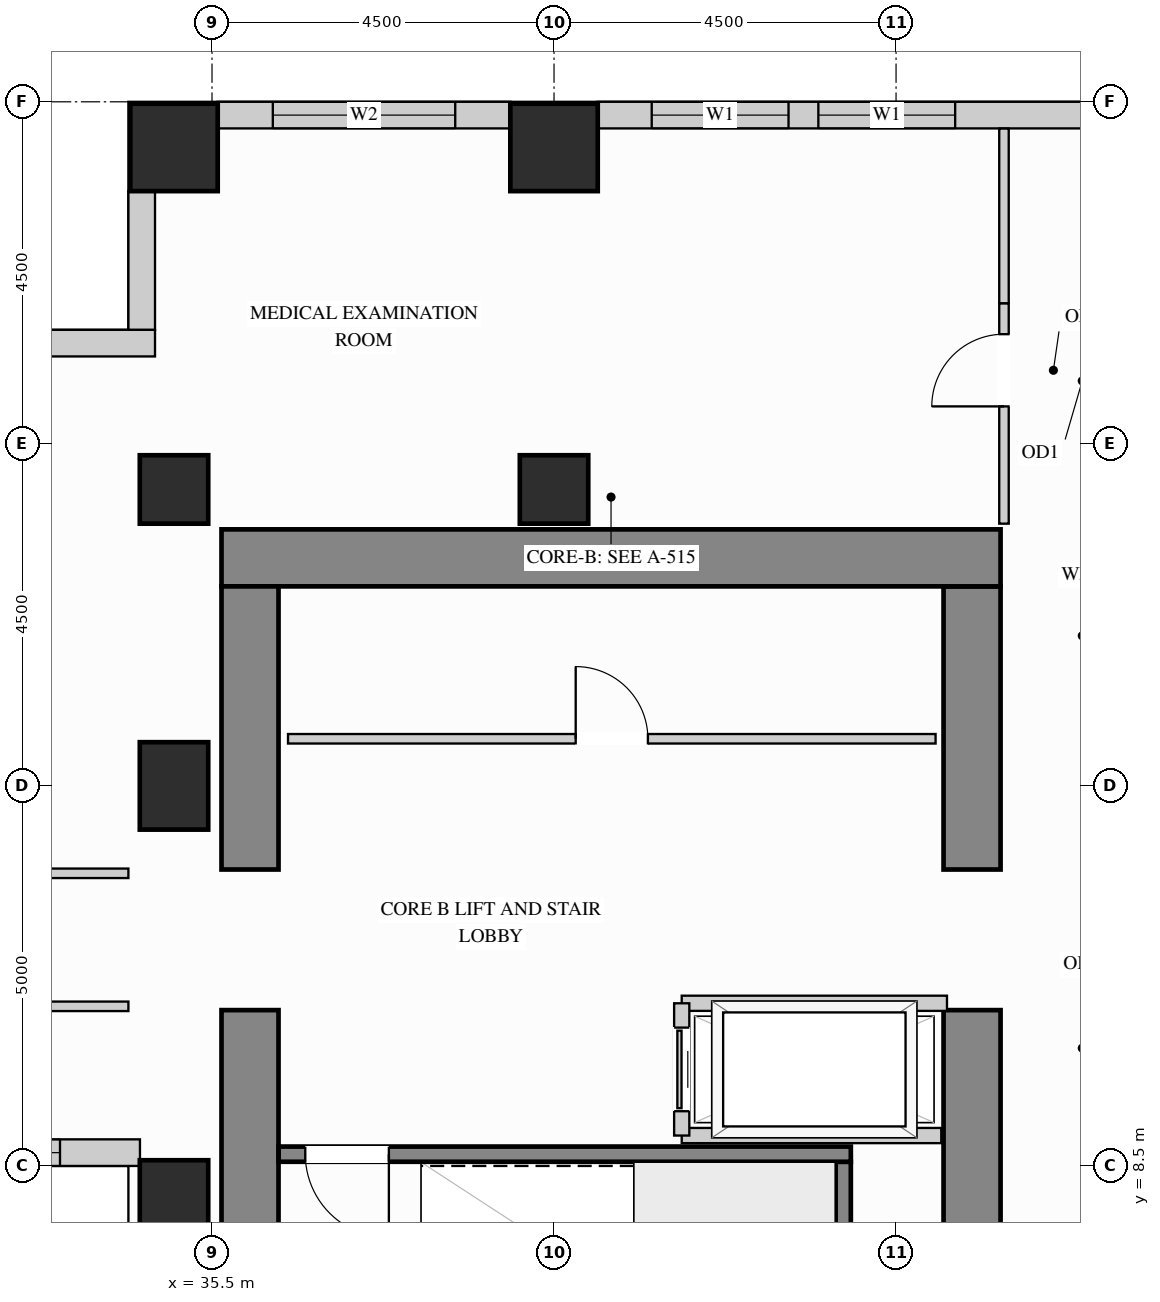
"""IFC4 building model, lengths in metres.
Left out: names, types, materials, properties, quantities, classifications, styles, units other than length and angle.
Written with IfcOpenShell. Run it as: python <this file> out.ifc"""

import sys

from ifc_helpers import new_model, si_unit, direction, frame, frame_2d, origin, origin_2d, place, context, subcontext, project, spatial, rectangle, extrude, source, transform, mapped, element, fill, save


model = new_model("IFC4")
c1 = context("Model", 3, precision=1e-05, world=origin(), true_north=direction((0.0, 1.0)))
c2 = subcontext(c1, "Body", "Model", "MODEL_VIEW")
j1 = project(units=[si_unit("LENGTHUNIT", "METRE"), si_unit("PLANEANGLEUNIT", "RADIAN")], contexts=[c1])
p1 = place(None, origin())
s1 = spatial("IfcSite", under=j1, at=p1, CompositionType="ELEMENT")
p2 = place(p1, origin())
s2 = spatial("IfcBuilding", under=s1, at=p2, CompositionType="ELEMENT")
p3 = place(p2, frame((0.0, 0.0, 91.8)))
s3 = spatial("IfcBuildingStorey", under=s2, at=p3, CompositionType="ELEMENT", Elevation=91.8)
m1 = source(origin(), c2, "Body", "SweptSolid", [
    extrude(rectangle(XDim=0.9, YDim=0.9, at=origin_2d()), origin(), (0.0, 0.0, 1.0), 3.38),
])
for number, where, z_axis, x_axis in (
    (1, (35.0, 17.4, 0.0), (0.0, 0.0, 1.0), (1.0, 0.0, 0.0)),
    (2, (40.0, 17.4, 0.0), (0.0, 0.0, 1.0), (1.0, 0.0, 0.0)),
):
    element("IfcColumn", number, at=place(p3, frame(where, z_axis=z_axis, x_axis=x_axis)), inside=s3, PredefinedType="COLUMN", context=c2, shape_type="MappedRepresentation", body=[
        mapped(m1, transform((0.0, 0.0, 0.0), x_axis=(1.0, 0.0, 0.0), y_axis=(0.0, 1.0, 0.0), z_axis=(0.0, 0.0, 1.0))),
    ])
m2 = source(origin(), c2, "Body", "SweptSolid", [
    extrude(rectangle(XDim=0.9, YDim=1.15, at=origin_2d()), origin(), (0.0, 0.0, 1.0), 3.38),
])
for number, where, z_axis, x_axis in (
    (3, (35.0, 13.5, 0.0), (0.0, 0.0, 1.0), (1.0, 0.0, 0.0)),
    (4, (35.0, 8.0, 0.0), (0.0, 0.0, 1.0), (1.0, 0.0, 0.0)),
):
    element("IfcColumn", number, at=place(p3, frame(where, z_axis=z_axis, x_axis=x_axis)), inside=s3, PredefinedType="COLUMN", context=c2, shape_type="MappedRepresentation", body=[
        mapped(m2, transform((0.0, 0.0, 0.0), x_axis=(1.0, 0.0, 0.0), y_axis=(0.0, 1.0, 0.0), z_axis=(0.0, 0.0, 1.0))),
    ])
m3 = source(origin(), c2, "Body", "SweptSolid", [
    extrude(rectangle(XDim=1.15, YDim=1.15, at=origin_2d()), origin(), (0.0, 0.0, 1.0), 3.38),
])
for number, where, z_axis, x_axis in (
    (5, (35.0, 21.9, 0.0), (0.0, 0.0, 1.0), (1.0, 0.0, 0.0)),
    (6, (40.0, 21.9, 0.0), (0.0, 0.0, 1.0), (1.0, 0.0, 0.0)),
):
    element("IfcColumn", number, at=place(p3, frame(where, z_axis=z_axis, x_axis=x_axis)), inside=s3, PredefinedType="COLUMN", context=c2, shape_type="MappedRepresentation", body=[
        mapped(m3, transform((0.0, 0.0, 0.0), x_axis=(1.0, 0.0, 0.0), y_axis=(0.0, 1.0, 0.0), z_axis=(0.0, 0.0, 1.0))),
    ])
m4 = source(origin(), c2, "Body", "SweptSolid", [
    extrude(rectangle(XDim=5.675, YDim=0.75, at=frame_2d((2.837, 0.0))), origin(), (0.0, 0.0, 1.0), 3.38),
])
p4 = place(p3, frame((45.5, 4.875, 0.0), z_axis=(0.0, 0.0, 1.0), x_axis=(0.0, 1.0, 0.0)))
e7 = element("IfcWall", 7, at=p4, inside=s3, PredefinedType="SHEAR", context=c2, shape_type="MappedRepresentation", body=[
    mapped(m4, transform((0.0, 0.0, 0.0), x_axis=(1.0, 0.0, 0.0), y_axis=(0.0, 1.0, 0.0), z_axis=(0.0, 0.0, 1.0))),
])
m5 = source(origin(), c2, "Body", "SweptSolid", [
    extrude(rectangle(XDim=3.725, YDim=0.75, at=frame_2d((1.863, 0.0))), origin(), (0.0, 0.0, 1.0), 3.38),
])
p5 = place(p3, frame((45.5, 12.4, 0.0), z_axis=(0.0, 0.0, 1.0), x_axis=(0.0, 1.0, 0.0)))
e8 = element("IfcWall", 8, at=p5, inside=s3, PredefinedType="SHEAR", context=c2, shape_type="MappedRepresentation", body=[
    mapped(m5, transform((0.0, 0.0, 0.0), x_axis=(1.0, 0.0, 0.0), y_axis=(0.0, 1.0, 0.0), z_axis=(0.0, 0.0, 1.0))),
])
m6 = source(origin(), c2, "Body", "SweptSolid", [
    extrude(rectangle(XDim=10.25, YDim=0.75, at=frame_2d((5.125, 0.0))), origin(), (0.0, 0.0, 1.0), 3.38),
])
p6 = place(p3, frame((35.625, 16.5, 0.0), z_axis=(0.0, 0.0, 1.0), x_axis=(1.0, 0.0, 0.0)))
e9 = element("IfcWall", 9, at=p6, inside=s3, PredefinedType="SHEAR", context=c2, shape_type="MappedRepresentation", body=[
    mapped(m6, transform((0.0, 0.0, 0.0), x_axis=(1.0, 0.0, 0.0), y_axis=(0.0, 1.0, 0.0), z_axis=(0.0, 0.0, 1.0))),
])
p7 = place(p3, frame((36.0, 4.875, 0.0), z_axis=(0.0, 0.0, 1.0), x_axis=(0.0, 1.0, 0.0)))
e10 = element("IfcWall", 10, at=p7, inside=s3, PredefinedType="SHEAR", context=c2, shape_type="MappedRepresentation", body=[
    mapped(m4, transform((0.0, 0.0, 0.0), x_axis=(1.0, 0.0, 0.0), y_axis=(0.0, 1.0, 0.0), z_axis=(0.0, 0.0, 1.0))),
])
p8 = place(p3, frame((36.0, 12.4, 0.0), z_axis=(0.0, 0.0, 1.0), x_axis=(0.0, 1.0, 0.0)))
e11 = element("IfcWall", 11, at=p8, inside=s3, PredefinedType="SHEAR", context=c2, shape_type="MappedRepresentation", body=[
    mapped(m5, transform((0.0, 0.0, 0.0), x_axis=(1.0, 0.0, 0.0), y_axis=(0.0, 1.0, 0.0), z_axis=(0.0, 0.0, 1.0))),
])
p9 = place(p3, frame((30.948, 8.675, 0.0), z_axis=(0.0, 0.0, 1.0), x_axis=(1.0, 0.0, 0.0)))
e12 = element("IfcWall", 12, at=p9, inside=s3, PredefinedType="SOLIDWALL", context=c2, shape_type="SweptSolid", body=[
    extrude(rectangle(XDim=3.604, YDim=0.35, at=frame_2d((1.802, 0.0))), origin(), (0.0, 0.0, 1.0), 3.365),
])
p10 = place(p9, frame((1.052, 0.0, 0.78)))
e13 = element("IfcOpeningElement", 13, at=p10, cuts=e12, PredefinedType="OPENING", context=c2, shape_type="SweptSolid", body=[
    extrude(rectangle(XDim=1.5, YDim=2.0, at=frame_2d((0.75, 1.0))), frame((0.0, 0.185, 0.0), z_axis=(0.0, -1.0, 0.0), x_axis=(1.0, 0.0, 0.0)), (0.0, 0.0, 1.0), 0.37),
])
p11 = place(p3, frame((47.027, 22.325, 0.0), z_axis=(0.0, 0.0, 1.0), x_axis=(-1.0, 0.0, 0.0)))
e14 = element("IfcWall", 14, at=p11, inside=s3, PredefinedType="SOLIDWALL", context=c2, shape_type="SweptSolid", body=[
    extrude(rectangle(XDim=6.454, YDim=0.35, at=frame_2d((3.227, 0.0))), origin(), (0.0, 0.0, 1.0), 3.365),
])
p12 = place(p11, frame((1.749, 0.0, 0.78)))
e15 = element("IfcOpeningElement", 15, at=p12, cuts=e14, PredefinedType="OPENING", context=c2, shape_type="SweptSolid", body=[
    extrude(rectangle(XDim=1.8, YDim=2.1, at=frame_2d((0.9, 1.05))), frame((0.0, 0.185, 0.0), z_axis=(0.0, -1.0, 0.0), x_axis=(1.0, 0.0, 0.0)), (0.0, 0.0, 1.0), 0.37),
])
p13 = place(p11, frame((3.942, 0.0, 0.78)))
e16 = element("IfcOpeningElement", 16, at=p13, cuts=e14, PredefinedType="OPENING", context=c2, shape_type="SweptSolid", body=[
    extrude(rectangle(XDim=1.8, YDim=2.1, at=frame_2d((0.9, 1.05))), frame((0.0, 0.185, 0.0), z_axis=(0.0, -1.0, 0.0), x_axis=(1.0, 0.0, 0.0)), (0.0, 0.0, 1.0), 0.37),
])
p14 = place(p3, frame((39.427, 22.325, 0.0), z_axis=(0.0, 0.0, 1.0), x_axis=(-1.0, 0.0, 0.0)))
e17 = element("IfcWall", 17, at=p14, inside=s3, PredefinedType="SOLIDWALL", context=c2, shape_type="SweptSolid", body=[
    extrude(rectangle(XDim=3.854, YDim=0.35, at=frame_2d((1.927, 0.0))), origin(), (0.0, 0.0, 1.0), 3.365),
])
p15 = place(p14, frame((0.727, 0.0, 0.78)))
e18 = element("IfcOpeningElement", 18, at=p15, cuts=e17, PredefinedType="OPENING", context=c2, shape_type="SweptSolid", body=[
    extrude(rectangle(XDim=2.4, YDim=2.1, at=frame_2d((1.2, 1.05))), frame((0.0, 0.185, 0.0), z_axis=(0.0, -1.0, 0.0), x_axis=(1.0, 0.0, 0.0)), (0.0, 0.0, 1.0), 0.37),
])
m7 = source(origin(), c2, "Body", "SweptSolid", [
    extrude(rectangle(XDim=1.829, YDim=0.35, at=frame_2d((0.915, 0.0))), origin(), (0.0, 0.0, 1.0), 3.365),
])
p16 = place(p3, frame((34.575, 21.327, 0.0), z_axis=(0.0, 0.0, 1.0), x_axis=(0.0, -1.0, 0.0)))
e19 = element("IfcWall", 19, at=p16, inside=s3, PredefinedType="SOLIDWALL", context=c2, shape_type="MappedRepresentation", body=[
    mapped(m7, transform((0.0, 0.0, 0.0), x_axis=(1.0, 0.0, 0.0), y_axis=(0.0, 1.0, 0.0), z_axis=(0.0, 0.0, 1.0))),
])
p17 = place(p3, frame((34.75, 19.325, 0.0), z_axis=(0.0, 0.0, 1.0), x_axis=(-1.0, 0.0, 0.0)))
e20 = element("IfcWall", 20, at=p17, inside=s3, PredefinedType="SOLIDWALL", context=c2, shape_type="SweptSolid", body=[
    extrude(rectangle(XDim=15.6, YDim=0.35, at=frame_2d((7.8, 0.0))), origin(), (0.0, 0.0, 1.0), 3.365),
])
p18 = place(p17, frame((4.307, 0.0, 0.78)))
e21 = element("IfcOpeningElement", 21, at=p18, cuts=e20, PredefinedType="OPENING", context=c2, shape_type="SweptSolid", body=[
    extrude(rectangle(XDim=1.5, YDim=2.0, at=frame_2d((0.75, 1.0))), frame((0.0, 0.185, 0.0), z_axis=(0.0, -1.0, 0.0), x_axis=(1.0, 0.0, 0.0)), (0.0, 0.0, 1.0), 0.37),
])
p19 = place(p17, frame((9.793, 0.0, 0.78)))
e22 = element("IfcOpeningElement", 22, at=p19, cuts=e20, PredefinedType="OPENING", context=c2, shape_type="SweptSolid", body=[
    extrude(rectangle(XDim=1.5, YDim=2.0, at=frame_2d((0.75, 1.0))), frame((0.0, 0.185, 0.0), z_axis=(0.0, -1.0, 0.0), x_axis=(1.0, 0.0, 0.0)), (0.0, 0.0, 1.0), 0.37),
])
p20 = place(p3, frame((36.5, 14.12, 0.0), z_axis=(0.0, 0.0, 1.0), x_axis=(1.0, 0.0, 0.0)))
e23 = element("IfcWall", 23, at=p20, inside=s3, PredefinedType="PARTITIONING", context=c2, shape_type="SweptSolid", body=[
    extrude(rectangle(XDim=8.52, YDim=0.125, at=frame_2d((4.26, 0.0))), origin(), (0.0, 0.0, 1.0), 3.365),
])
p21 = place(p20, frame((3.785, 0.0, 0.0)))
e24 = element("IfcOpeningElement", 24, at=p21, cuts=e23, PredefinedType="OPENING", context=c2, shape_type="SweptSolid", body=[
    extrude(rectangle(XDim=0.95, YDim=2.15, at=frame_2d((0.475, 1.075))), frame((0.0, 0.073, 0.0), z_axis=(0.0, -1.0, 0.0), x_axis=(1.0, 0.0, 0.0)), (0.0, 0.0, 1.0), 0.145),
])
p22 = place(p3, frame((45.92, 16.95, 0.0), z_axis=(0.0, 0.0, 1.0), x_axis=(0.0, 1.0, 0.0)))
e25 = element("IfcWall", 25, at=p22, inside=s3, PredefinedType="PARTITIONING", context=c2, shape_type="SweptSolid", body=[
    extrude(rectangle(XDim=2.9, YDim=0.125, at=frame_2d((1.45, 0.0))), origin(), (0.0, 0.0, 1.0), 3.365),
])
p23 = place(p22, frame((1.543, 0.0, 0.0)))
e26 = element("IfcOpeningElement", 26, at=p23, cuts=e25, PredefinedType="OPENING", context=c2, shape_type="SweptSolid", body=[
    extrude(rectangle(XDim=0.95, YDim=2.15, at=frame_2d((0.475, 1.075))), frame((0.0, 0.073, 0.0), z_axis=(0.0, -1.0, 0.0), x_axis=(1.0, 0.0, 0.0)), (0.0, 0.0, 1.0), 0.145),
])
m8 = source(origin(), c2, "Body", "SweptSolid", [
    extrude(rectangle(XDim=2.298, YDim=0.125, at=frame_2d((1.149, 0.0))), origin(), (0.0, 0.0, 1.0), 3.365),
])
p24 = place(p3, frame((45.92, 19.85, 0.0), z_axis=(0.0, 0.0, 1.0), x_axis=(0.0, 1.0, 0.0)))
e27 = element("IfcWall", 27, at=p24, inside=s3, PredefinedType="PARTITIONING", context=c2, shape_type="MappedRepresentation", body=[
    mapped(m8, transform((0.0, 0.0, 0.0), x_axis=(1.0, 0.0, 0.0), y_axis=(0.0, 1.0, 0.0), z_axis=(0.0, 0.0, 1.0))),
])
p25 = place(p3, frame((29.85, 12.35, 0.0), z_axis=(0.0, 0.0, 1.0), x_axis=(1.0, 0.0, 0.0)))
e28 = element("IfcWall", 28, at=p25, inside=s3, PredefinedType="PARTITIONING", context=c2, shape_type="SweptSolid", body=[
    extrude(rectangle(XDim=4.55, YDim=0.125, at=frame_2d((2.275, 0.0))), origin(), (0.0, 0.0, 1.0), 3.365),
])
p26 = place(p25, frame((1.8, 0.0, 0.0)))
e29 = element("IfcOpeningElement", 29, at=p26, cuts=e28, PredefinedType="OPENING", context=c2, shape_type="SweptSolid", body=[
    extrude(rectangle(XDim=0.95, YDim=2.15, at=frame_2d((0.475, 1.075))), frame((0.0, 0.073, 0.0), z_axis=(0.0, -1.0, 0.0), x_axis=(1.0, 0.0, 0.0)), (0.0, 0.0, 1.0), 0.145),
])
p27 = place(p3, frame((19.5, 10.6, 0.0), z_axis=(0.0, 0.0, 1.0), x_axis=(1.0, 0.0, 0.0)))
e30 = element("IfcWall", 30, at=p27, inside=s3, PredefinedType="PARTITIONING", context=c2, shape_type="SweptSolid", body=[
    extrude(rectangle(XDim=14.9, YDim=0.125, at=frame_2d((7.45, 0.0))), origin(), (0.0, 0.0, 1.0), 3.365),
])
p28 = place(p27, frame((6.975, 0.0, 0.0)))
e31 = element("IfcOpeningElement", 31, at=p28, cuts=e30, PredefinedType="OPENING", context=c2, shape_type="SweptSolid", body=[
    extrude(rectangle(XDim=0.95, YDim=2.15, at=frame_2d((0.475, 1.075))), frame((0.0, 0.073, 0.0), z_axis=(0.0, -1.0, 0.0), x_axis=(1.0, 0.0, 0.0)), (0.0, 0.0, 1.0), 0.145),
])
m9 = source(origin(), c2, "Body", "SweptSolid", [
    extrude(rectangle(XDim=3.49, YDim=0.2, at=frame_2d((1.745, 0.0))), origin(), (0.0, 0.0, 1.0), 3.365),
])
p29 = place(p3, frame((41.68, 10.64, 0.0), z_axis=(0.0, 0.0, 1.0), x_axis=(1.0, 0.0, 0.0)))
e32 = element("IfcWall", 32, at=p29, inside=s3, PredefinedType="PARTITIONING", context=c2, shape_type="MappedRepresentation", body=[
    mapped(m9, transform((0.0, 0.0, 0.0), x_axis=(1.0, 0.0, 0.0), y_axis=(0.0, 1.0, 0.0), z_axis=(0.0, 0.0, 1.0))),
])
m10 = source(origin(), c2, "Body", "SweptSolid", [
    extrude(rectangle(XDim=3.415, YDim=0.2, at=frame_2d((1.708, 0.0))), origin(), (0.0, 0.0, 1.0), 3.365),
])
p30 = place(p3, frame((41.68, 8.9, 0.0), z_axis=(0.0, 0.0, 1.0), x_axis=(1.0, 0.0, 0.0)))
e33 = element("IfcWall", 33, at=p30, inside=s3, PredefinedType="PARTITIONING", context=c2, shape_type="MappedRepresentation", body=[
    mapped(m10, transform((0.0, 0.0, 0.0), x_axis=(1.0, 0.0, 0.0), y_axis=(0.0, 1.0, 0.0), z_axis=(0.0, 0.0, 1.0))),
])
p31 = place(p3, frame((41.68, 8.9, 0.0), z_axis=(0.0, 0.0, 1.0), x_axis=(0.0, 1.0, 0.0)))
e34 = element("IfcWall", 34, at=p31, inside=s3, PredefinedType="PARTITIONING", context=c2, shape_type="SweptSolid", body=[
    extrude(rectangle(XDim=1.74, YDim=0.2, at=frame_2d((0.87, 0.0))), origin(), (0.0, 0.0, 1.0), 3.365),
])
p32 = place(p31, frame((0.32, 0.0, 0.0)))
e35 = element("IfcOpeningElement", 35, at=p32, cuts=e34, PredefinedType="OPENING", context=c2, shape_type="SweptSolid", body=[
    extrude(rectangle(XDim=1.1, YDim=2.2, at=frame_2d((0.55, 1.1))), frame((0.0, 0.11, 0.0), z_axis=(0.0, -1.0, 0.0), x_axis=(1.0, 0.0, 0.0)), (0.0, 0.0, 1.0), 0.22),
])
m11 = source(origin(), c2, "Body", "SweptSolid", [
    extrude(rectangle(XDim=3.678, YDim=0.2, at=frame_2d((1.839, 0.0))), origin(), (0.0, 0.0, 1.0), 3.38),
])
p33 = place(p3, frame((43.805, 4.877, 0.0), z_axis=(0.0, 0.0, 1.0), x_axis=(0.0, 1.0, 0.0)))
e36 = element("IfcWall", 36, at=p33, inside=s3, PredefinedType="SHEAR", context=c2, shape_type="MappedRepresentation", body=[
    mapped(m11, transform((0.0, 0.0, 0.0), x_axis=(1.0, 0.0, 0.0), y_axis=(0.0, 1.0, 0.0), z_axis=(0.0, 0.0, 1.0))),
])
p34 = place(p3, frame((36.377, 8.655, 0.0), z_axis=(0.0, 0.0, 1.0), x_axis=(1.0, 0.0, 0.0)))
e37 = element("IfcWall", 37, at=p34, inside=s3, PredefinedType="SHEAR", context=c2, shape_type="SweptSolid", body=[
    extrude(rectangle(XDim=7.528, YDim=0.2, at=frame_2d((3.764, 0.0))), origin(), (0.0, 0.0, 1.0), 3.38),
])
p35 = place(p34, frame((0.35, 0.0, 0.0)))
e38 = element("IfcOpeningElement", 38, at=p35, cuts=e37, PredefinedType="OPENING", context=c2, shape_type="SweptSolid", body=[
    extrude(rectangle(XDim=1.1, YDim=2.15, at=frame_2d((0.55, 1.075))), frame((0.0, 0.11, 0.0), z_axis=(0.0, -1.0, 0.0), x_axis=(1.0, 0.0, 0.0)), (0.0, 0.0, 1.0), 0.22),
])
m12 = source(origin(), c2, "Body", "SweptSolid", [
    extrude(rectangle(XDim=1.1, YDim=2.2, at=frame_2d((0.55, 1.1))), frame((0.0, 0.025, 0.0), z_axis=(0.0, -1.0, 0.0), x_axis=(1.0, 0.0, 0.0)), (0.0, 0.0, 1.0), 0.05),
])
p36 = place(p32, origin())
e39 = element("IfcDoor", 39, at=p36, inside=s3, OperationType="SLIDING_TO_LEFT", PredefinedType="DOOR", context=c2, shape_type="MappedRepresentation", body=[
    mapped(m12, transform((0.0, 0.0, 0.0), x_axis=(1.0, 0.0, 0.0), y_axis=(0.0, 1.0, 0.0), z_axis=(0.0, 0.0, 1.0))),
])
fill(e35, e39)
m13 = source(origin(), c2, "Body", "SweptSolid", [
    extrude(rectangle(XDim=0.95, YDim=2.15, at=frame_2d((0.475, 1.075))), frame((0.0, 0.025, 0.0), z_axis=(0.0, -1.0, 0.0), x_axis=(1.0, 0.0, 0.0)), (0.0, 0.0, 1.0), 0.05),
])
p37 = place(p21, origin())
e40 = element("IfcDoor", 40, at=p37, inside=s3, OperationType="SINGLE_SWING_LEFT", PredefinedType="DOOR", context=c2, shape_type="MappedRepresentation", body=[
    mapped(m13, transform((0.0, 0.0, 0.0), x_axis=(1.0, 0.0, 0.0), y_axis=(0.0, 1.0, 0.0), z_axis=(0.0, 0.0, 1.0))),
])
fill(e24, e40)
p38 = place(p23, origin())
e41 = element("IfcDoor", 41, at=p38, inside=s3, OperationType="SINGLE_SWING_LEFT", PredefinedType="DOOR", context=c2, shape_type="MappedRepresentation", body=[
    mapped(m13, transform((0.0, 0.0, 0.0), x_axis=(1.0, 0.0, 0.0), y_axis=(0.0, 1.0, 0.0), z_axis=(0.0, 0.0, 1.0))),
])
fill(e26, e41)
m14 = source(origin(), c2, "Body", "SweptSolid", [
    extrude(rectangle(XDim=1.1, YDim=2.15, at=frame_2d((0.55, 1.075))), frame((0.0, 0.025, 0.0), z_axis=(0.0, -1.0, 0.0), x_axis=(1.0, 0.0, 0.0)), (0.0, 0.0, 1.0), 0.05),
])
p39 = place(p35, origin())
e42 = element("IfcDoor", 42, at=p39, inside=s3, OperationType="SINGLE_SWING_RIGHT", PredefinedType="DOOR", context=c2, shape_type="MappedRepresentation", body=[
    mapped(m14, transform((0.0, 0.0, 0.0), x_axis=(1.0, 0.0, 0.0), y_axis=(0.0, 1.0, 0.0), z_axis=(0.0, 0.0, 1.0))),
])
fill(e38, e42)
m15 = source(origin(), c2, "Body", "SweptSolid", [
    extrude(rectangle(XDim=1.8, YDim=2.1, at=frame_2d((0.9, 1.05))), frame((0.0, 0.03, 0.0), z_axis=(0.0, -1.0, 0.0), x_axis=(1.0, 0.0, 0.0)), (0.0, 0.0, 1.0), 0.06),
])
p40 = place(p12, origin())
e43 = element("IfcWindow", 43, at=p40, inside=s3, PartitioningType="SINGLE_PANEL", PredefinedType="WINDOW", context=c2, shape_type="MappedRepresentation", body=[
    mapped(m15, transform((0.0, 0.0, 0.0), x_axis=(1.0, 0.0, 0.0), y_axis=(0.0, 1.0, 0.0), z_axis=(0.0, 0.0, 1.0))),
])
fill(e15, e43)
p41 = place(p13, origin())
e44 = element("IfcWindow", 44, at=p41, inside=s3, PartitioningType="SINGLE_PANEL", PredefinedType="WINDOW", context=c2, shape_type="MappedRepresentation", body=[
    mapped(m15, transform((0.0, 0.0, 0.0), x_axis=(1.0, 0.0, 0.0), y_axis=(0.0, 1.0, 0.0), z_axis=(0.0, 0.0, 1.0))),
])
fill(e16, e44)
m16 = source(origin(), c2, "Body", "SweptSolid", [
    extrude(rectangle(XDim=2.4, YDim=2.1, at=frame_2d((1.2, 1.05))), frame((0.0, 0.03, 0.0), z_axis=(0.0, -1.0, 0.0), x_axis=(1.0, 0.0, 0.0)), (0.0, 0.0, 1.0), 0.06),
])
p42 = place(p15, origin())
e45 = element("IfcWindow", 45, at=p42, inside=s3, PartitioningType="SINGLE_PANEL", PredefinedType="WINDOW", context=c2, shape_type="MappedRepresentation", body=[
    mapped(m16, transform((0.0, 0.0, 0.0), x_axis=(1.0, 0.0, 0.0), y_axis=(0.0, 1.0, 0.0), z_axis=(0.0, 0.0, 1.0))),
])
fill(e18, e45)
m17 = source(origin(), c2, "Body", "SweptSolid", [
    extrude(rectangle(XDim=1.5, YDim=2.0, at=frame_2d((0.75, 1.0))), frame((0.0, 0.03, 0.0), z_axis=(0.0, -1.0, 0.0), x_axis=(1.0, 0.0, 0.0)), (0.0, 0.0, 1.0), 0.06),
])
p43 = place(p10, origin())
e46 = element("IfcWindow", 46, at=p43, inside=s3, PartitioningType="SINGLE_PANEL", PredefinedType="WINDOW", context=c2, shape_type="MappedRepresentation", body=[
    mapped(m17, transform((0.0, 0.0, 0.0), x_axis=(1.0, 0.0, 0.0), y_axis=(0.0, 1.0, 0.0), z_axis=(0.0, 0.0, 1.0))),
])
fill(e13, e46)
save(model, sys.argv[1])
